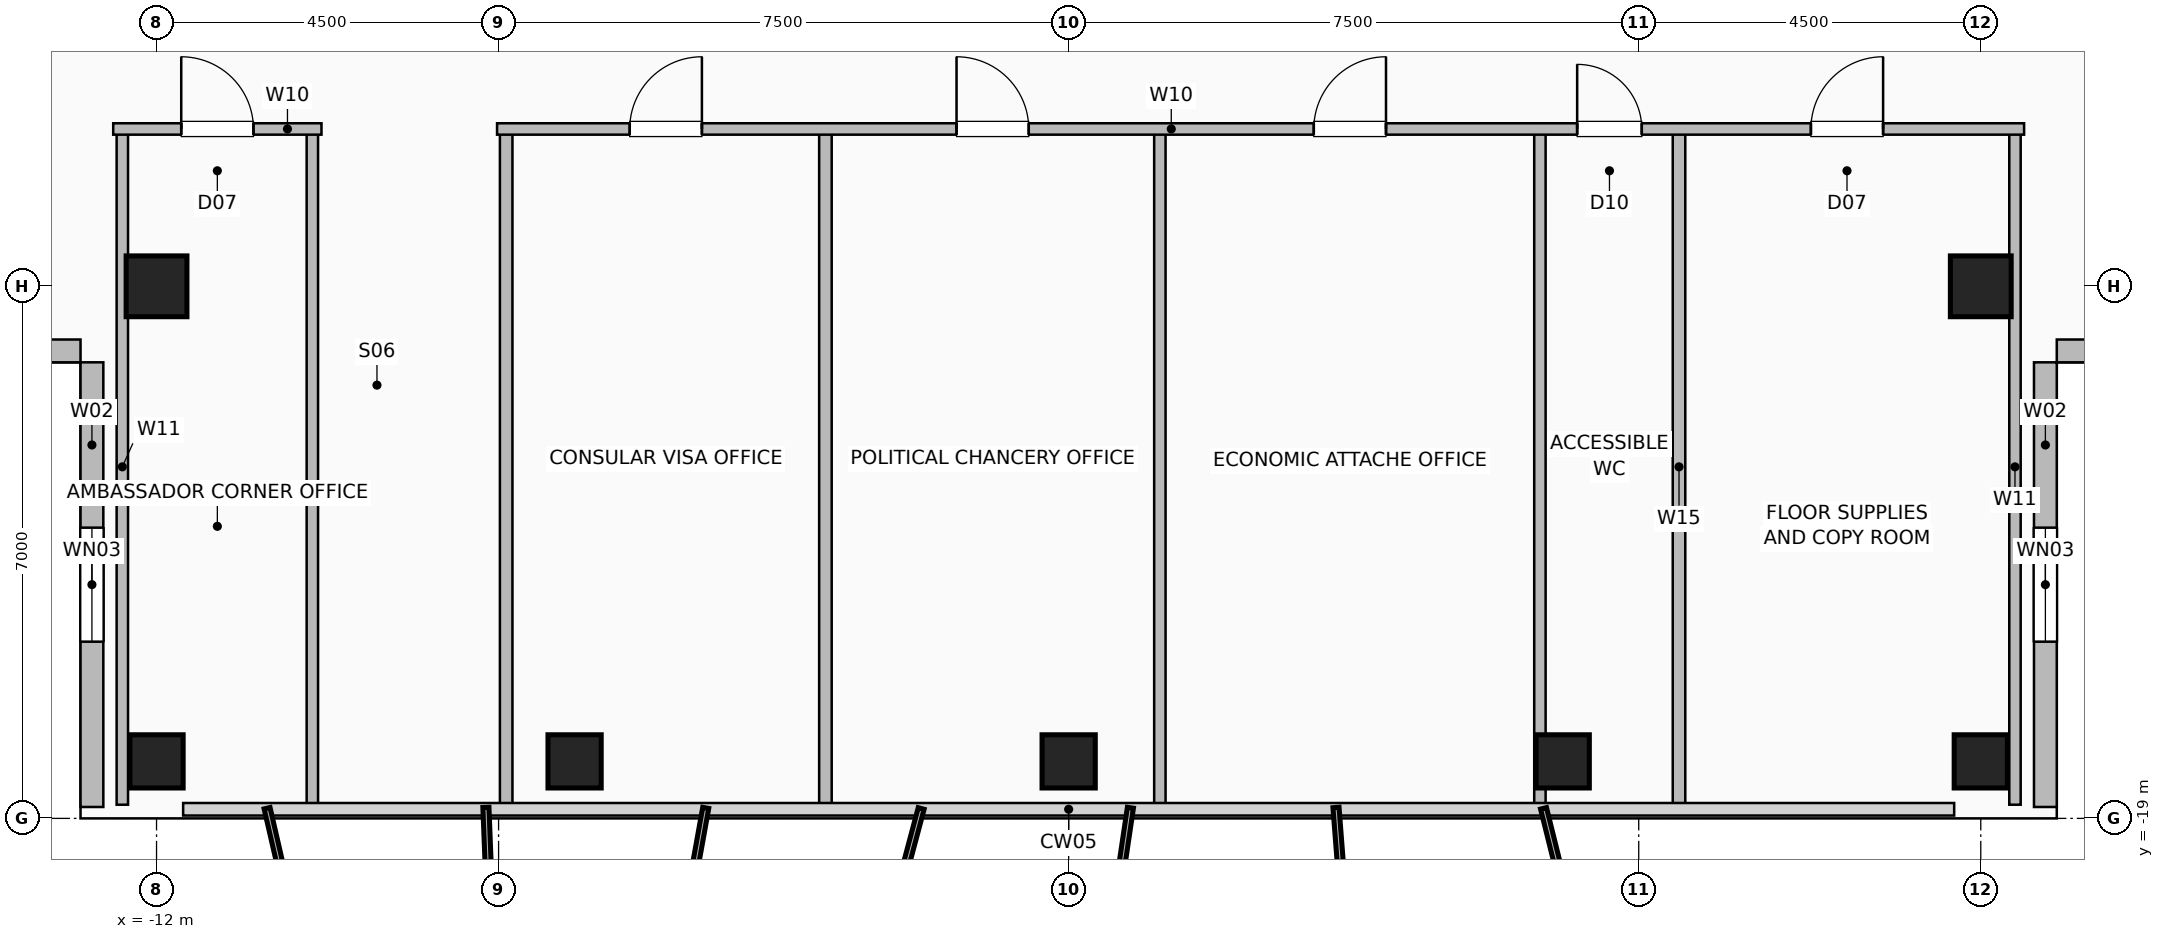
"""IFC4 building model, lengths in metres.
Left out: names, types, materials, properties, quantities, classifications, styles, units other than length and angle.
Written with IfcOpenShell. Run it as: python <this file> out.ifc"""

import sys

from ifc_helpers import new_model, si_unit, direction, frame, frame_2d, origin, origin_2d, place, context, subcontext, project, spatial, rectangle, hollow_rectangle, extrude, element, fill, save


model = new_model("IFC4")
c1 = context("Model", 3, precision=1e-05, world=origin(), true_north=direction((0.0, 1.0)))
c2 = subcontext(c1, "Body", "Model", "MODEL_VIEW")
j1 = project(units=[si_unit("LENGTHUNIT", "METRE"), si_unit("PLANEANGLEUNIT", "RADIAN")], contexts=[c1])
p1 = place(None, origin())
s1 = spatial("IfcSite", under=j1, at=p1, CompositionType="ELEMENT")
p2 = place(p1, origin())
s2 = spatial("IfcBuilding", under=s1, at=p2, CompositionType="ELEMENT")
p3 = place(p2, frame((0.0, 0.0, 239.6)))
s3 = spatial("IfcBuildingStorey", under=s2, at=p3, CompositionType="ELEMENT", Elevation=239.6)
for number, where, z_axis, x_axis in (
    (1, (-12.0, -18.25, 0.0), (0.0, 0.0, 1.0), (1.0, 0.0, 0.0)),
    (2, (-6.5, -18.25, 0.0), (0.0, 0.0, 1.0), (1.0, 0.0, 0.0)),
    (3, (0.0, -18.25, 0.0), (0.0, 0.0, 1.0), (1.0, 0.0, 0.0)),
    (4, (6.5, -18.25, 0.0), (0.0, 0.0, 1.0), (1.0, 0.0, 0.0)),
    (5, (12.0, -18.25, 0.0), (0.0, 0.0, 1.0), (1.0, 0.0, 0.0)),
):
    element("IfcColumn", number, at=place(p3, frame(where, z_axis=z_axis, x_axis=x_axis)), inside=s3, PredefinedType="COLUMN", context=c2, shape_type="SweptSolid", body=[
        extrude(hollow_rectangle(XDim=0.7, YDim=0.7, WallThickness=0.035, at=origin_2d()), origin(), (0.0, 0.0, 1.0), 3.6),
    ])
for number, where, z_axis, x_axis in (
    (6, (-12.0, -12.0, 0.0), (0.0, 0.0, 1.0), (1.0, 0.0, 0.0)),
    (7, (12.0, -12.0, 0.0), (0.0, 0.0, 1.0), (1.0, 0.0, 0.0)),
):
    element("IfcColumn", number, at=place(p3, frame(where, z_axis=z_axis, x_axis=x_axis)), inside=s3, PredefinedType="COLUMN", context=c2, shape_type="SweptSolid", body=[
        extrude(hollow_rectangle(XDim=0.8, YDim=0.8, WallThickness=0.04, at=origin_2d()), origin(), (0.0, 0.0, 1.0), 3.6),
    ])
p4 = place(p3, frame((-12.85, -18.85, 0.0), z_axis=(0.0, 0.0, 1.0), x_axis=(0.0, 1.0, 0.0)))
e8 = element("IfcWall", 8, at=p4, inside=s3, PredefinedType="SOLIDWALL", context=c2, shape_type="SweptSolid", body=[
    extrude(rectangle(XDim=5.85, YDim=0.3, at=frame_2d((2.925, 0.0))), origin(), (0.0, 0.0, 1.0), 3.36),
])
p5 = place(p4, frame((2.175, 0.0, 0.9)))
e9 = element("IfcOpeningElement", 9, at=p5, cuts=e8, PredefinedType="OPENING", context=c2, shape_type="SweptSolid", body=[
    extrude(rectangle(XDim=1.5, YDim=1.8, at=frame_2d((0.75, 0.9))), frame((0.0, 0.16, 0.0), z_axis=(0.0, -1.0, 0.0), x_axis=(1.0, 0.0, 0.0)), (0.0, 0.0, 1.0), 0.32),
])
p6 = place(p3, frame((-18.85, -12.85, 0.0), z_axis=(0.0, 0.0, 1.0), x_axis=(1.0, 0.0, 0.0)))
e10 = element("IfcWall", 10, at=p6, inside=s3, PredefinedType="SOLIDWALL", context=c2, shape_type="SweptSolid", body=[
    extrude(rectangle(XDim=5.85, YDim=0.3, at=frame_2d((2.925, 0.0))), origin(), (0.0, 0.0, 1.0), 3.36),
])
p7 = place(p3, frame((12.85, -18.85, 0.0), z_axis=(0.0, 0.0, 1.0), x_axis=(0.0, 1.0, 0.0)))
e11 = element("IfcWall", 11, at=p7, inside=s3, PredefinedType="SOLIDWALL", context=c2, shape_type="SweptSolid", body=[
    extrude(rectangle(XDim=5.85, YDim=0.3, at=frame_2d((2.925, 0.0))), origin(), (0.0, 0.0, 1.0), 3.36),
])
p8 = place(p7, frame((2.175, 0.0, 0.9)))
e12 = element("IfcOpeningElement", 12, at=p8, cuts=e11, PredefinedType="OPENING", context=c2, shape_type="SweptSolid", body=[
    extrude(rectangle(XDim=1.5, YDim=1.8, at=frame_2d((0.75, 0.9))), frame((0.0, 0.16, 0.0), z_axis=(0.0, -1.0, 0.0), x_axis=(1.0, 0.0, 0.0)), (0.0, 0.0, 1.0), 0.32),
])
p9 = place(p3, frame((18.85, -12.85, 0.0), z_axis=(0.0, 0.0, 1.0), x_axis=(-1.0, 0.0, 0.0)))
e13 = element("IfcWall", 13, at=p9, inside=s3, PredefinedType="SOLIDWALL", context=c2, shape_type="SweptSolid", body=[
    extrude(rectangle(XDim=5.85, YDim=0.3, at=frame_2d((2.925, 0.0))), origin(), (0.0, 0.0, 1.0), 3.36),
])
for number, where, z_axis, x_axis in (
    (14, (-12.45, -18.82, 0.0), (0.0, 0.0, 1.0), (0.0, 1.0, 0.0)),
    (15, (-9.95, -18.82, 0.0), (0.0, 0.0, 1.0), (0.0, 1.0, 0.0)),
):
    element("IfcWall", number, at=place(p3, frame(where, z_axis=z_axis, x_axis=x_axis)), inside=s3, PredefinedType="PARTITIONING", context=c2, shape_type="SweptSolid", body=[
        extrude(rectangle(XDim=8.89, YDim=0.15, at=frame_2d((4.445, 0.0))), origin(), (0.0, 0.0, 1.0), 3.36),
    ])
p10 = place(p3, frame((-12.57, -9.93, 0.0), z_axis=(0.0, 0.0, 1.0), x_axis=(1.0, 0.0, 0.0)))
e16 = element("IfcWall", 16, at=p10, inside=s3, PredefinedType="PARTITIONING", context=c2, shape_type="SweptSolid", body=[
    extrude(rectangle(XDim=2.74, YDim=0.15, at=frame_2d((1.37, 0.0))), origin(), (0.0, 0.0, 1.0), 3.36),
])
p11 = place(p10, frame((0.895, 0.0, 0.0)))
e17 = element("IfcOpeningElement", 17, at=p11, cuts=e16, PredefinedType="OPENING", context=c2, shape_type="SweptSolid", body=[
    extrude(rectangle(XDim=0.95, YDim=2.06, at=frame_2d((0.475, 1.03))), frame((0.0, 0.085, 0.0), z_axis=(0.0, -1.0, 0.0), x_axis=(1.0, 0.0, 0.0)), (0.0, 0.0, 1.0), 0.17),
])
for number, where, z_axis, x_axis in (
    (18, (8.03, -18.82, 0.0), (0.0, 0.0, 1.0), (0.0, 1.0, 0.0)),
    (19, (-7.4, -18.82, 0.0), (0.0, 0.0, 1.0), (0.0, 1.0, 0.0)),
    (20, (-3.2, -18.82, 0.0), (0.0, 0.0, 1.0), (0.0, 1.0, 0.0)),
):
    element("IfcWall", number, at=place(p3, frame(where, z_axis=z_axis, x_axis=x_axis)), inside=s3, PredefinedType="PLUMBINGWALL", context=c2, shape_type="SweptSolid", body=[
        extrude(rectangle(XDim=8.89, YDim=0.165, at=frame_2d((4.445, 0.0))), origin(), (0.0, 0.0, 1.0), 3.36),
    ])
for number, where, z_axis, x_axis in (
    (21, (1.2, -18.82, 0.0), (0.0, 0.0, 1.0), (0.0, 1.0, 0.0)),
    (22, (6.2, -18.82, 0.0), (0.0, 0.0, 1.0), (0.0, 1.0, 0.0)),
    (23, (12.45, -18.82, 0.0), (0.0, 0.0, 1.0), (0.0, 1.0, 0.0)),
):
    element("IfcWall", number, at=place(p3, frame(where, z_axis=z_axis, x_axis=x_axis)), inside=s3, PredefinedType="PARTITIONING", context=c2, shape_type="SweptSolid", body=[
        extrude(rectangle(XDim=8.89, YDim=0.15, at=frame_2d((4.445, 0.0))), origin(), (0.0, 0.0, 1.0), 3.36),
    ])
p12 = place(p3, frame((-7.52, -9.93, 0.0), z_axis=(0.0, 0.0, 1.0), x_axis=(1.0, 0.0, 0.0)))
e24 = element("IfcWall", 24, at=p12, inside=s3, PredefinedType="PARTITIONING", context=c2, shape_type="SweptSolid", body=[
    extrude(rectangle(XDim=20.09, YDim=0.15, at=frame_2d((10.045, 0.0))), origin(), (0.0, 0.0, 1.0), 3.36),
])
p13 = place(p12, frame((1.745, 0.0, 0.0)))
e25 = element("IfcOpeningElement", 25, at=p13, cuts=e24, PredefinedType="OPENING", context=c2, shape_type="SweptSolid", body=[
    extrude(rectangle(XDim=0.95, YDim=2.06, at=frame_2d((0.475, 1.03))), frame((0.0, 0.085, 0.0), z_axis=(0.0, -1.0, 0.0), x_axis=(1.0, 0.0, 0.0)), (0.0, 0.0, 1.0), 0.17),
])
p14 = place(p12, frame((6.045, 0.0, 0.0)))
e26 = element("IfcOpeningElement", 26, at=p14, cuts=e24, PredefinedType="OPENING", context=c2, shape_type="SweptSolid", body=[
    extrude(rectangle(XDim=0.95, YDim=2.06, at=frame_2d((0.475, 1.03))), frame((0.0, 0.085, 0.0), z_axis=(0.0, -1.0, 0.0), x_axis=(1.0, 0.0, 0.0)), (0.0, 0.0, 1.0), 0.17),
])
p15 = place(p12, frame((10.745, 0.0, 0.0)))
e27 = element("IfcOpeningElement", 27, at=p15, cuts=e24, PredefinedType="OPENING", context=c2, shape_type="SweptSolid", body=[
    extrude(rectangle(XDim=0.95, YDim=2.06, at=frame_2d((0.475, 1.03))), frame((0.0, 0.085, 0.0), z_axis=(0.0, -1.0, 0.0), x_axis=(1.0, 0.0, 0.0)), (0.0, 0.0, 1.0), 0.17),
])
p16 = place(p12, frame((14.21, 0.0, 0.0)))
e28 = element("IfcOpeningElement", 28, at=p16, cuts=e24, PredefinedType="OPENING", context=c2, shape_type="SweptSolid", body=[
    extrude(rectangle(XDim=0.85, YDim=2.05, at=frame_2d((0.425, 1.025))), frame((0.0, 0.085, 0.0), z_axis=(0.0, -1.0, 0.0), x_axis=(1.0, 0.0, 0.0)), (0.0, 0.0, 1.0), 0.17),
])
p17 = place(p12, frame((17.285, 0.0, 0.0)))
e29 = element("IfcOpeningElement", 29, at=p17, cuts=e24, PredefinedType="OPENING", context=c2, shape_type="SweptSolid", body=[
    extrude(rectangle(XDim=0.95, YDim=2.06, at=frame_2d((0.475, 1.03))), frame((0.0, 0.085, 0.0), z_axis=(0.0, -1.0, 0.0), x_axis=(1.0, 0.0, 0.0)), (0.0, 0.0, 1.0), 0.17),
])
p18 = place(p5, origin())
e30 = element("IfcWindow", 30, at=p18, inside=s3, PartitioningType="SINGLE_PANEL", PredefinedType="WINDOW", context=c2, shape_type="SweptSolid", body=[
    extrude(rectangle(XDim=1.5, YDim=1.8, at=frame_2d((0.75, 0.9))), frame((0.0, 0.03, 0.0), z_axis=(0.0, -1.0, 0.0), x_axis=(1.0, 0.0, 0.0)), (0.0, 0.0, 1.0), 0.06),
])
fill(e9, e30)
p19 = place(p8, origin())
e31 = element("IfcWindow", 31, at=p19, inside=s3, PartitioningType="SINGLE_PANEL", PredefinedType="WINDOW", context=c2, shape_type="SweptSolid", body=[
    extrude(rectangle(XDim=1.5, YDim=1.8, at=frame_2d((0.75, 0.9))), frame((0.0, 0.03, 0.0), z_axis=(0.0, -1.0, 0.0), x_axis=(1.0, 0.0, 0.0)), (0.0, 0.0, 1.0), 0.06),
])
fill(e12, e31)
p20 = place(p11, origin())
e32 = element("IfcDoor", 32, at=p20, inside=s3, OperationType="SINGLE_SWING_LEFT", PredefinedType="DOOR", context=c2, shape_type="SweptSolid", body=[
    extrude(rectangle(XDim=0.95, YDim=2.06, at=frame_2d((0.475, 1.03))), frame((0.0, 0.025, 0.0), z_axis=(0.0, -1.0, 0.0), x_axis=(1.0, 0.0, 0.0)), (0.0, 0.0, 1.0), 0.05),
])
fill(e17, e32)
p21 = place(p13, origin())
e33 = element("IfcDoor", 33, at=p21, inside=s3, OperationType="SINGLE_SWING_RIGHT", PredefinedType="DOOR", context=c2, shape_type="SweptSolid", body=[
    extrude(rectangle(XDim=0.95, YDim=2.06, at=frame_2d((0.475, 1.03))), frame((0.0, 0.025, 0.0), z_axis=(0.0, -1.0, 0.0), x_axis=(1.0, 0.0, 0.0)), (0.0, 0.0, 1.0), 0.05),
])
fill(e25, e33)
p22 = place(p14, origin())
e34 = element("IfcDoor", 34, at=p22, inside=s3, OperationType="SINGLE_SWING_LEFT", PredefinedType="DOOR", context=c2, shape_type="SweptSolid", body=[
    extrude(rectangle(XDim=0.95, YDim=2.06, at=frame_2d((0.475, 1.03))), frame((0.0, 0.025, 0.0), z_axis=(0.0, -1.0, 0.0), x_axis=(1.0, 0.0, 0.0)), (0.0, 0.0, 1.0), 0.05),
])
fill(e26, e34)
p23 = place(p15, origin())
e35 = element("IfcDoor", 35, at=p23, inside=s3, OperationType="SINGLE_SWING_RIGHT", PredefinedType="DOOR", context=c2, shape_type="SweptSolid", body=[
    extrude(rectangle(XDim=0.95, YDim=2.06, at=frame_2d((0.475, 1.03))), frame((0.0, 0.025, 0.0), z_axis=(0.0, -1.0, 0.0), x_axis=(1.0, 0.0, 0.0)), (0.0, 0.0, 1.0), 0.05),
])
fill(e27, e35)
p24 = place(p16, origin())
e36 = element("IfcDoor", 36, at=p24, inside=s3, OperationType="SINGLE_SWING_LEFT", PredefinedType="DOOR", context=c2, shape_type="SweptSolid", body=[
    extrude(rectangle(XDim=0.85, YDim=2.05, at=frame_2d((0.425, 1.025))), frame((0.0, 0.025, 0.0), z_axis=(0.0, -1.0, 0.0), x_axis=(1.0, 0.0, 0.0)), (0.0, 0.0, 1.0), 0.05),
])
fill(e28, e36)
p25 = place(p17, origin())
e37 = element("IfcDoor", 37, at=p25, inside=s3, OperationType="SINGLE_SWING_RIGHT", PredefinedType="DOOR", context=c2, shape_type="SweptSolid", body=[
    extrude(rectangle(XDim=0.95, YDim=2.06, at=frame_2d((0.475, 1.03))), frame((0.0, 0.025, 0.0), z_axis=(0.0, -1.0, 0.0), x_axis=(1.0, 0.0, 0.0)), (0.0, 0.0, 1.0), 0.05),
])
fill(e29, e37)
save(model, sys.argv[1])
